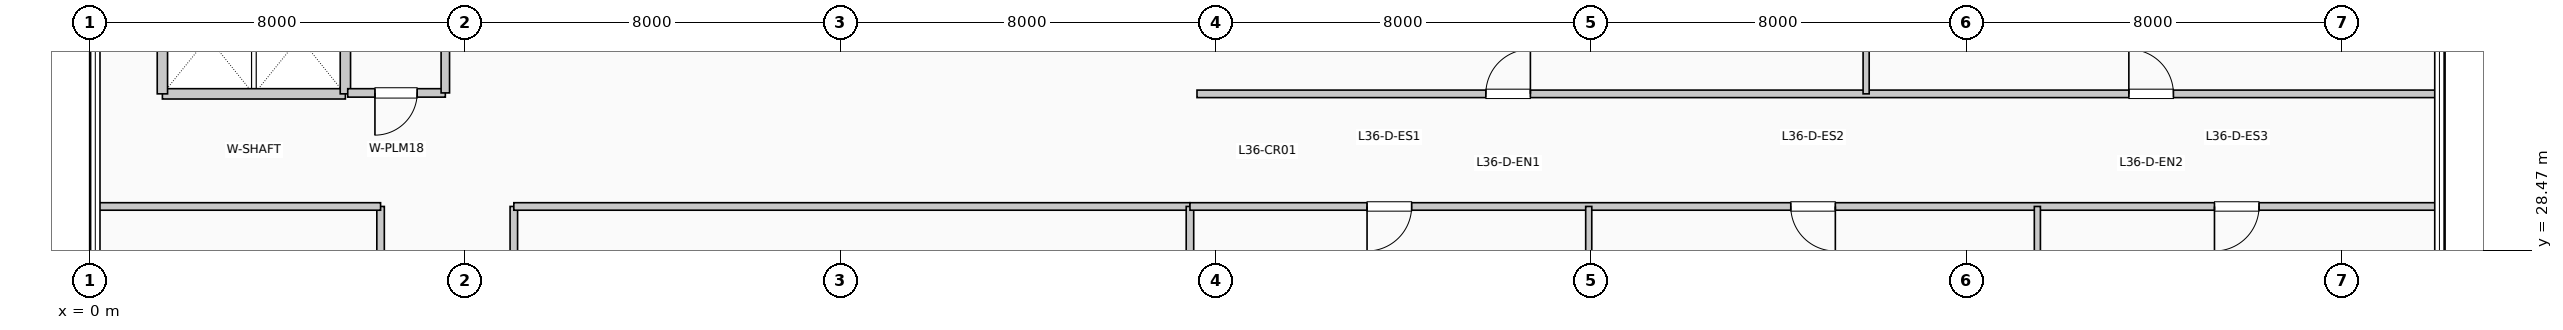
"""IFC4 building model, lengths in metres.
Left out: names, types, materials, properties, quantities, classifications, styles, units other than length and angle.
Written with IfcOpenShell. Run it as: python <this file> out.ifc"""

import sys

from ifc_helpers import new_model, si_unit, direction, frame, frame_2d, origin, place, context, subcontext, project, spatial, rectangle, extrude, element, fill, save


model = new_model("IFC4")
c1 = context("Model", 3, precision=1e-05, world=origin(), true_north=direction((0.0, 1.0)))
c2 = subcontext(c1, "Body", "Model", "MODEL_VIEW")
j1 = project(units=[si_unit("LENGTHUNIT", "METRE"), si_unit("PLANEANGLEUNIT", "RADIAN")], contexts=[c1])
p1 = place(None, origin())
s1 = spatial("IfcSite", under=j1, at=p1, CompositionType="ELEMENT")
p2 = place(p1, origin())
s2 = spatial("IfcBuilding", under=s1, at=p2, CompositionType="ELEMENT")
p3 = place(p2, frame((0.0, 0.0, 150.81)))
s3 = spatial("IfcBuildingStorey", under=s2, at=p3, CompositionType="ELEMENT", Elevation=150.81)
p4 = place(p3, frame((1.55, 31.8, 0.0), z_axis=(0.0, 0.0, 1.0), x_axis=(1.0, 0.0, 0.0)))
e1 = element("IfcWall", 1, at=p4, inside=s3, PredefinedType="PARTITIONING", context=c2, shape_type="SweptSolid", body=[
    extrude(rectangle(XDim=3.9, YDim=0.22, at=frame_2d((1.95, 0.0))), origin(), (0.0, 0.0, 1.0), 3.71),
])
for number, where, z_axis, x_axis in (
    (2, (1.55, 31.8, 0.0), (0.0, 0.0, 1.0), (0.0, 1.0, 0.0)),
    (3, (5.45, 31.8, 0.0), (0.0, 0.0, 1.0), (0.0, 1.0, 0.0)),
):
    element("IfcWall", number, at=place(p3, frame(where, z_axis=z_axis, x_axis=x_axis)), inside=s3, PredefinedType="PARTITIONING", context=c2, shape_type="SweptSolid", body=[
        extrude(rectangle(XDim=2.38, YDim=0.22, at=frame_2d((1.19, 0.0))), origin(), (0.0, 0.0, 1.0), 3.71),
    ])
p5 = place(p3, frame((5.5, 31.82, 0.0), z_axis=(0.0, 0.0, 1.0), x_axis=(1.0, 0.0, 0.0)))
e4 = element("IfcWall", 4, at=p5, inside=s3, PredefinedType="PLUMBINGWALL", context=c2, shape_type="SweptSolid", body=[
    extrude(rectangle(XDim=2.08, YDim=0.18, at=frame_2d((1.04, 0.0))), origin(), (0.0, 0.0, 1.0), 3.71),
])
p6 = place(p5, frame((1.48, 0.0, 0.0), z_axis=(0.0, 0.0, 1.0), x_axis=(-1.0, 0.0, 0.0)))
e5 = element("IfcOpeningElement", 5, at=p6, cuts=e4, PredefinedType="OPENING", context=c2, shape_type="SweptSolid", body=[
    extrude(rectangle(XDim=0.9, YDim=2.1, at=frame_2d((0.45, 1.05))), frame((0.0, 0.1, 0.0), z_axis=(0.0, -1.0, 0.0), x_axis=(1.0, 0.0, 0.0)), (0.0, 0.0, 1.0), 0.2),
])
p7 = place(p3, frame((7.58, 31.82, 0.0), z_axis=(0.0, 0.0, 1.0), x_axis=(0.0, 1.0, 0.0)))
e6 = element("IfcWall", 6, at=p7, inside=s3, PredefinedType="PLUMBINGWALL", context=c2, shape_type="SweptSolid", body=[
    extrude(rectangle(XDim=2.36, YDim=0.18, at=frame_2d((1.18, 0.0))), origin(), (0.0, 0.0, 1.0), 3.71),
])
p8 = place(p3, frame((6.2, 6.8, 0.0), z_axis=(0.0, 0.0, 1.0), x_axis=(0.0, 1.0, 0.0)))
e7 = element("IfcWall", 7, at=p8, inside=s3, PredefinedType="PARTITIONING", context=c2, shape_type="SweptSolid", body=[
    extrude(rectangle(XDim=22.6, YDim=0.16, at=frame_2d((11.3, 0.0))), origin(), (0.0, 0.0, 1.0), 3.71),
])
p9 = place(p8, frame((5.221, 0.0, 0.0), z_axis=(0.0, 0.0, 1.0), x_axis=(-1.0, 0.0, 0.0)))
e8 = element("IfcOpeningElement", 8, at=p9, cuts=e7, PredefinedType="OPENING", context=c2, shape_type="SweptSolid", body=[
    extrude(rectangle(XDim=0.95, YDim=2.15, at=frame_2d((0.475, 1.075))), frame((0.0, 0.09, 0.0), z_axis=(0.0, -1.0, 0.0), x_axis=(1.0, 0.0, 0.0)), (0.0, 0.0, 1.0), 0.18),
])
p10 = place(p8, frame((16.521, 0.0, 0.0), z_axis=(0.0, 0.0, 1.0), x_axis=(-1.0, 0.0, 0.0)))
e9 = element("IfcOpeningElement", 9, at=p10, cuts=e7, PredefinedType="OPENING", context=c2, shape_type="SweptSolid", body=[
    extrude(rectangle(XDim=0.95, YDim=2.15, at=frame_2d((0.475, 1.075))), frame((0.0, 0.09, 0.0), z_axis=(0.0, -1.0, 0.0), x_axis=(1.0, 0.0, 0.0)), (0.0, 0.0, 1.0), 0.18),
])
p11 = place(p3, frame((9.04, 6.8, 0.0), z_axis=(0.0, 0.0, 1.0), x_axis=(0.0, 1.0, 0.0)))
e10 = element("IfcWall", 10, at=p11, inside=s3, PredefinedType="PARTITIONING", context=c2, shape_type="SweptSolid", body=[
    extrude(rectangle(XDim=22.6, YDim=0.16, at=frame_2d((11.3, 0.0))), origin(), (0.0, 0.0, 1.0), 3.71),
])
p12 = place(p11, frame((2.237, 0.0, 0.0)))
e11 = element("IfcOpeningElement", 11, at=p12, cuts=e10, PredefinedType="OPENING", context=c2, shape_type="SweptSolid", body=[
    extrude(rectangle(XDim=0.95, YDim=2.15, at=frame_2d((0.475, 1.075))), frame((0.0, 0.09, 0.0), z_axis=(0.0, -1.0, 0.0), x_axis=(1.0, 0.0, 0.0)), (0.0, 0.0, 1.0), 0.18),
])
p13 = place(p11, frame((8.113, 0.0, 0.0)))
e12 = element("IfcOpeningElement", 12, at=p13, cuts=e10, PredefinedType="OPENING", context=c2, shape_type="SweptSolid", body=[
    extrude(rectangle(XDim=0.95, YDim=2.15, at=frame_2d((0.475, 1.075))), frame((0.0, 0.09, 0.0), z_axis=(0.0, -1.0, 0.0), x_axis=(1.0, 0.0, 0.0)), (0.0, 0.0, 1.0), 0.18),
])
p14 = place(p11, frame((14.215, 0.0, 0.0)))
e13 = element("IfcOpeningElement", 13, at=p14, cuts=e10, PredefinedType="OPENING", context=c2, shape_type="SweptSolid", body=[
    extrude(rectangle(XDim=0.95, YDim=2.15, at=frame_2d((0.475, 1.075))), frame((0.0, 0.09, 0.0), z_axis=(0.0, -1.0, 0.0), x_axis=(1.0, 0.0, 0.0)), (0.0, 0.0, 1.0), 0.18),
])
p15 = place(p11, frame((19.639, 0.0, 0.0)))
e14 = element("IfcOpeningElement", 14, at=p15, cuts=e10, PredefinedType="OPENING", context=c2, shape_type="SweptSolid", body=[
    extrude(rectangle(XDim=0.95, YDim=2.15, at=frame_2d((0.475, 1.075))), frame((0.0, 0.09, 0.0), z_axis=(0.0, -1.0, 0.0), x_axis=(1.0, 0.0, 0.0)), (0.0, 0.0, 1.0), 0.18),
])
p16 = place(p3, frame((0.19, 29.4, 0.0), z_axis=(0.0, 0.0, 1.0), x_axis=(1.0, 0.0, 0.0)))
e15 = element("IfcWall", 15, at=p16, inside=s3, PredefinedType="PARTITIONING", context=c2, shape_type="SweptSolid", body=[
    extrude(rectangle(XDim=6.01, YDim=0.16, at=frame_2d((3.005, 0.0))), origin(), (0.0, 0.0, 1.0), 3.365),
])
p17 = place(p3, frame((9.04, 29.4, 0.0), z_axis=(0.0, 0.0, 1.0), x_axis=(1.0, 0.0, 0.0)))
e16 = element("IfcWall", 16, at=p17, inside=s3, PredefinedType="PARTITIONING", context=c2, shape_type="SweptSolid", body=[
    extrude(rectangle(XDim=14.41, YDim=0.16, at=frame_2d((7.205, 0.0))), origin(), (0.0, 0.0, 1.0), 3.365),
])
p18 = place(p3, frame((23.45, 0.19, 0.0), z_axis=(0.0, 0.0, 1.0), x_axis=(0.0, 1.0, 0.0)))
e17 = element("IfcWall", 17, at=p18, inside=s3, PredefinedType="PARTITIONING", context=c2, shape_type="SweptSolid", body=[
    extrude(rectangle(XDim=29.21, YDim=0.16, at=frame_2d((14.605, 0.0))), origin(), (0.0, 0.0, 1.0), 3.045),
])
p19 = place(p3, frame((23.45, 29.4, 0.0), z_axis=(0.0, 0.0, 1.0), x_axis=(1.0, 0.0, 0.0)))
e18 = element("IfcWall", 18, at=p19, inside=s3, PredefinedType="PARTITIONING", context=c2, shape_type="SweptSolid", body=[
    extrude(rectangle(XDim=26.56, YDim=0.16, at=frame_2d((13.28, 0.0))), origin(), (0.0, 0.0, 1.0), 3.365),
])
p20 = place(p19, frame((4.725, 0.0, 0.0), z_axis=(0.0, 0.0, 1.0), x_axis=(-1.0, 0.0, 0.0)))
e19 = element("IfcOpeningElement", 19, at=p20, cuts=e18, PredefinedType="OPENING", context=c2, shape_type="SweptSolid", body=[
    extrude(rectangle(XDim=0.95, YDim=2.15, at=frame_2d((0.475, 1.075))), frame((0.0, 0.09, 0.0), z_axis=(0.0, -1.0, 0.0), x_axis=(1.0, 0.0, 0.0)), (0.0, 0.0, 1.0), 0.18),
])
p21 = place(p19, frame((13.755, 0.0, 0.0), z_axis=(0.0, 0.0, 1.0), x_axis=(-1.0, 0.0, 0.0)))
e20 = element("IfcOpeningElement", 20, at=p21, cuts=e18, PredefinedType="OPENING", context=c2, shape_type="SweptSolid", body=[
    extrude(rectangle(XDim=0.95, YDim=2.15, at=frame_2d((0.475, 1.075))), frame((0.0, 0.09, 0.0), z_axis=(0.0, -1.0, 0.0), x_axis=(1.0, 0.0, 0.0)), (0.0, 0.0, 1.0), 0.18),
])
p22 = place(p19, frame((22.785, 0.0, 0.0), z_axis=(0.0, 0.0, 1.0), x_axis=(-1.0, 0.0, 0.0)))
e21 = element("IfcOpeningElement", 21, at=p22, cuts=e18, PredefinedType="OPENING", context=c2, shape_type="SweptSolid", body=[
    extrude(rectangle(XDim=0.95, YDim=2.15, at=frame_2d((0.475, 1.075))), frame((0.0, 0.09, 0.0), z_axis=(0.0, -1.0, 0.0), x_axis=(1.0, 0.0, 0.0)), (0.0, 0.0, 1.0), 0.18),
])
p23 = place(p3, frame((23.6, 31.8, 0.0), z_axis=(0.0, 0.0, 1.0), x_axis=(1.0, 0.0, 0.0)))
e22 = element("IfcWall", 22, at=p23, inside=s3, PredefinedType="PARTITIONING", context=c2, shape_type="SweptSolid", body=[
    extrude(rectangle(XDim=26.41, YDim=0.16, at=frame_2d((13.205, 0.0))), origin(), (0.0, 0.0, 1.0), 3.71),
])
p24 = place(p23, frame((6.156, 0.0, 0.0)))
e23 = element("IfcOpeningElement", 23, at=p24, cuts=e22, PredefinedType="OPENING", context=c2, shape_type="SweptSolid", body=[
    extrude(rectangle(XDim=0.95, YDim=2.15, at=frame_2d((0.475, 1.075))), frame((0.0, 0.09, 0.0), z_axis=(0.0, -1.0, 0.0), x_axis=(1.0, 0.0, 0.0)), (0.0, 0.0, 1.0), 0.18),
])
p25 = place(p23, frame((19.861, 0.0, 0.0)))
e24 = element("IfcOpeningElement", 24, at=p25, cuts=e22, PredefinedType="OPENING", context=c2, shape_type="SweptSolid", body=[
    extrude(rectangle(XDim=0.95, YDim=2.15, at=frame_2d((0.475, 1.075))), frame((0.0, 0.09, 0.0), z_axis=(0.0, -1.0, 0.0), x_axis=(1.0, 0.0, 0.0)), (0.0, 0.0, 1.0), 0.18),
])
for number, where, z_axis, x_axis in (
    (25, (31.949, 22.19, 0.0), (0.0, 0.0, 1.0), (0.0, 1.0, 0.0)),
    (26, (41.511, 22.19, 0.0), (0.0, 0.0, 1.0), (0.0, 1.0, 0.0)),
):
    element("IfcWall", number, at=place(p3, frame(where, z_axis=z_axis, x_axis=x_axis)), inside=s3, PredefinedType="PARTITIONING", context=c2, shape_type="SweptSolid", body=[
        extrude(rectangle(XDim=7.21, YDim=0.13, at=frame_2d((3.605, 0.0))), origin(), (0.0, 0.0, 1.0), 3.71),
    ])
p26 = place(p3, frame((37.861, 31.8, 0.0), z_axis=(0.0, 0.0, 1.0), x_axis=(0.0, 1.0, 0.0)))
e27 = element("IfcWall", 27, at=p26, inside=s3, PredefinedType="PARTITIONING", context=c2, shape_type="SweptSolid", body=[
    extrude(rectangle(XDim=14.01, YDim=0.13, at=frame_2d((7.005, 0.0))), origin(), (0.0, 0.0, 1.0), 3.71),
])
p27 = place(p6, origin())
e28 = element("IfcDoor", 28, at=p27, inside=s3, OperationType="SINGLE_SWING_LEFT", PredefinedType="DOOR", context=c2, shape_type="SweptSolid", body=[
    extrude(rectangle(XDim=0.9, YDim=2.1, at=frame_2d((0.45, 1.05))), frame((0.0, 0.025, 0.0), z_axis=(0.0, -1.0, 0.0), x_axis=(1.0, 0.0, 0.0)), (0.0, 0.0, 1.0), 0.05),
])
fill(e5, e28)
p28 = place(p20, origin())
e29 = element("IfcDoor", 29, at=p28, inside=s3, OperationType="SINGLE_SWING_LEFT", PredefinedType="DOOR", context=c2, shape_type="SweptSolid", body=[
    extrude(rectangle(XDim=0.95, YDim=2.15, at=frame_2d((0.475, 1.075))), frame((0.0, 0.025, 0.0), z_axis=(0.0, -1.0, 0.0), x_axis=(1.0, 0.0, 0.0)), (0.0, 0.0, 1.0), 0.05),
])
fill(e19, e29)
p29 = place(p21, origin())
e30 = element("IfcDoor", 30, at=p29, inside=s3, OperationType="SINGLE_SWING_RIGHT", PredefinedType="DOOR", context=c2, shape_type="SweptSolid", body=[
    extrude(rectangle(XDim=0.95, YDim=2.15, at=frame_2d((0.475, 1.075))), frame((0.0, 0.025, 0.0), z_axis=(0.0, -1.0, 0.0), x_axis=(1.0, 0.0, 0.0)), (0.0, 0.0, 1.0), 0.05),
])
fill(e20, e30)
p30 = place(p22, origin())
e31 = element("IfcDoor", 31, at=p30, inside=s3, OperationType="SINGLE_SWING_LEFT", PredefinedType="DOOR", context=c2, shape_type="SweptSolid", body=[
    extrude(rectangle(XDim=0.95, YDim=2.15, at=frame_2d((0.475, 1.075))), frame((0.0, 0.025, 0.0), z_axis=(0.0, -1.0, 0.0), x_axis=(1.0, 0.0, 0.0)), (0.0, 0.0, 1.0), 0.05),
])
fill(e21, e31)
p31 = place(p24, origin())
e32 = element("IfcDoor", 32, at=p31, inside=s3, OperationType="SINGLE_SWING_RIGHT", PredefinedType="DOOR", context=c2, shape_type="SweptSolid", body=[
    extrude(rectangle(XDim=0.95, YDim=2.15, at=frame_2d((0.475, 1.075))), frame((0.0, 0.025, 0.0), z_axis=(0.0, -1.0, 0.0), x_axis=(1.0, 0.0, 0.0)), (0.0, 0.0, 1.0), 0.05),
])
fill(e23, e32)
p32 = place(p25, origin())
e33 = element("IfcDoor", 33, at=p32, inside=s3, OperationType="SINGLE_SWING_LEFT", PredefinedType="DOOR", context=c2, shape_type="SweptSolid", body=[
    extrude(rectangle(XDim=0.95, YDim=2.15, at=frame_2d((0.475, 1.075))), frame((0.0, 0.025, 0.0), z_axis=(0.0, -1.0, 0.0), x_axis=(1.0, 0.0, 0.0)), (0.0, 0.0, 1.0), 0.05),
])
fill(e24, e33)
save(model, sys.argv[1])
